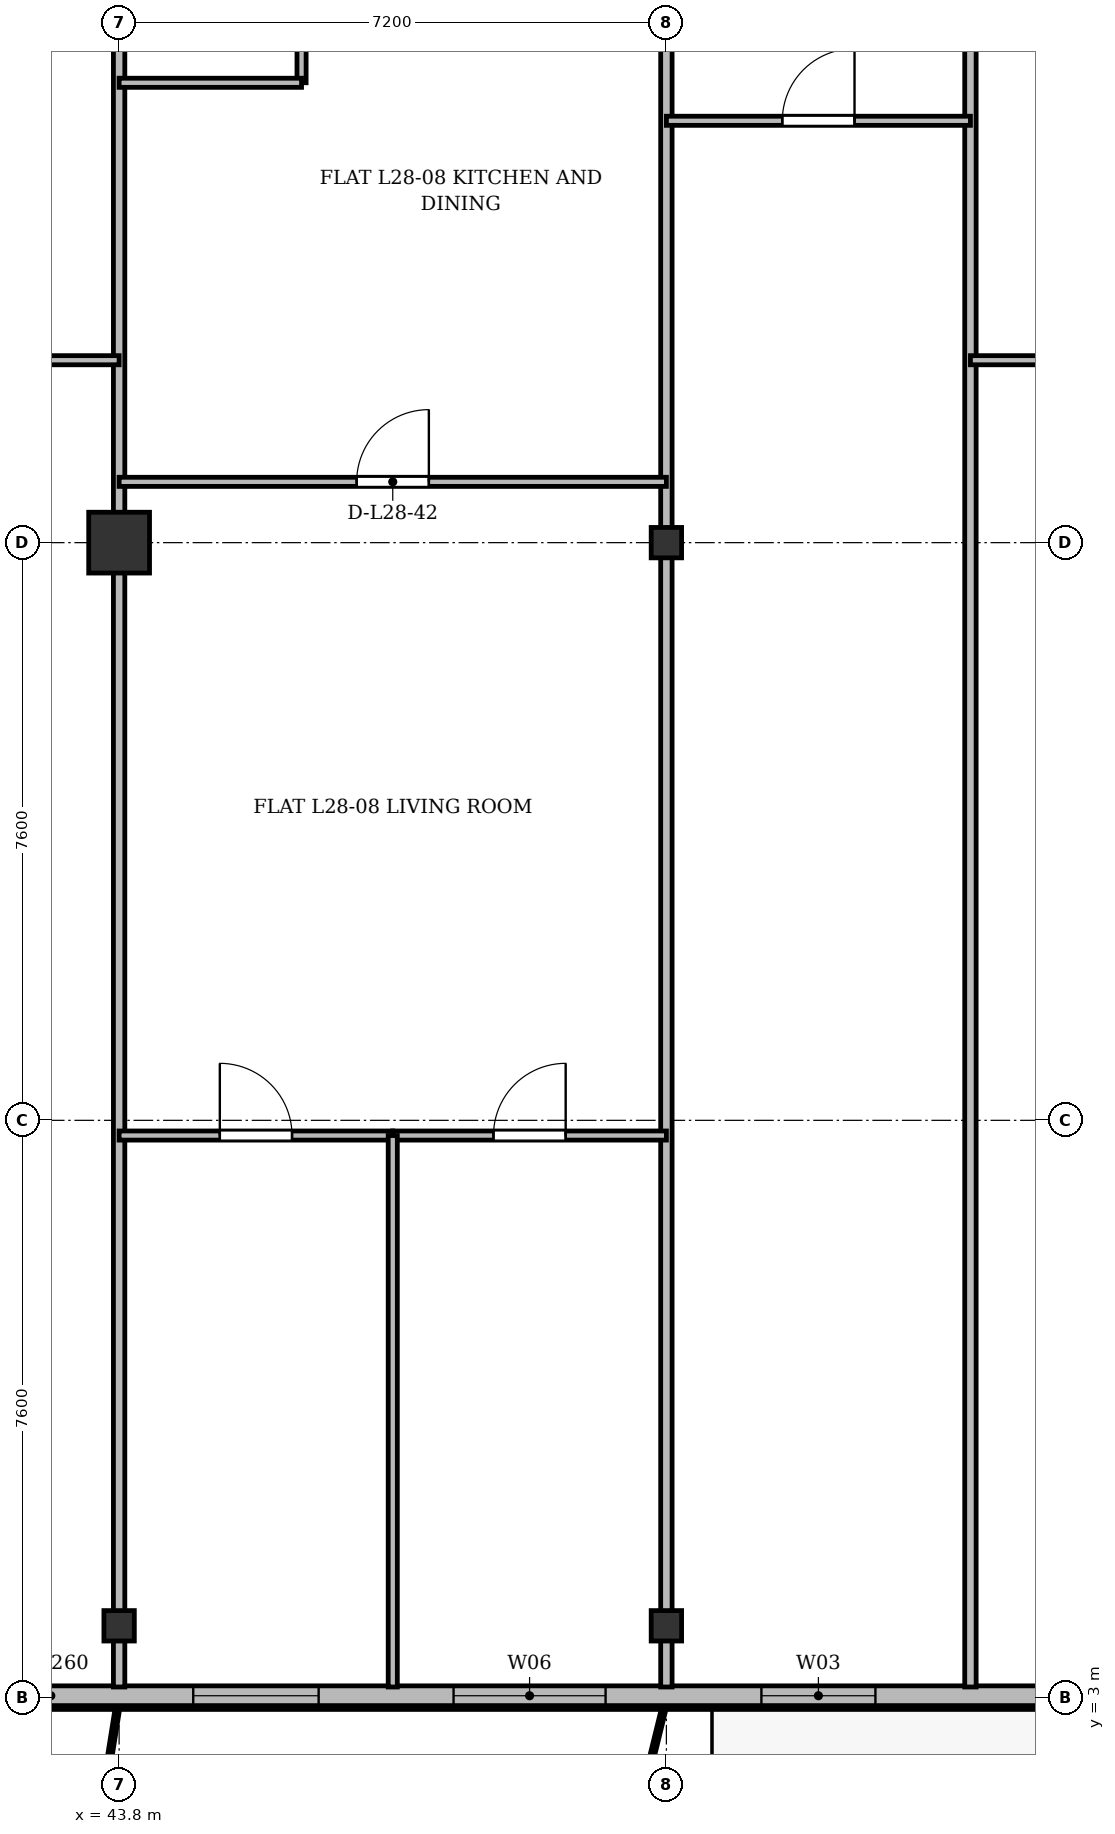
"""IFC4 building model, lengths in metres.
Left out: names, types, materials, properties, quantities, classifications, styles, units other than length and angle.
Written with IfcOpenShell. Run it as: python <this file> out.ifc"""

import sys

from ifc_helpers import new_model, si_unit, direction, frame, frame_2d, origin, origin_2d, place, context, subcontext, project, spatial, rectangle, i_section, extrude, source, transform, mapped, element, fill, save


model = new_model("IFC4")
c1 = context("Model", 3, precision=1e-05, world=origin(), true_north=direction((0.0, 1.0)))
c2 = subcontext(c1, "Body", "Model", "MODEL_VIEW")
j1 = project(units=[si_unit("LENGTHUNIT", "METRE"), si_unit("PLANEANGLEUNIT", "RADIAN")], contexts=[c1])
p1 = place(None, origin())
s1 = spatial("IfcSite", under=j1, at=p1, CompositionType="ELEMENT")
p2 = place(p1, origin())
s2 = spatial("IfcBuilding", under=s1, at=p2, CompositionType="ELEMENT")
p3 = place(p2, frame((0.0, 0.0, 110.5)))
s3 = spatial("IfcBuildingStorey", under=s2, at=p3, CompositionType="ELEMENT", Elevation=110.5)
m1 = source(origin(), c2, "Body", "SweptSolid", [
    extrude(i_section(OverallWidth=0.4, OverallDepth=0.4, WebThickness=0.022, FlangeThickness=0.035, at=origin_2d()), origin(), (0.0, 0.0, 1.0), 3.6),
])
p4 = place(p3, frame((43.8, 3.95, 0.0), z_axis=(0.0, 0.0, 1.0), x_axis=(1.0, 0.0, 0.0)))
e1 = element("IfcColumn", 1, at=p4, inside=s3, PredefinedType="COLUMN", context=c2, shape_type="MappedRepresentation", body=[
    mapped(m1, transform((0.0, 0.0, 0.0), x_axis=(1.0, 0.0, 0.0), y_axis=(0.0, 1.0, 0.0), z_axis=(0.0, 0.0, 1.0), scale=1.0)),
])
m2 = source(origin(), c2, "Body", "SweptSolid", [
    extrude(rectangle(XDim=0.8, YDim=0.8, at=origin_2d()), origin(), (0.0, 0.0, 1.0), 3.6),
])
p5 = place(p3, frame((43.8, 18.2, 0.0), z_axis=(0.0, 0.0, 1.0), x_axis=(1.0, 0.0, 0.0)))
e2 = element("IfcColumn", 2, at=p5, inside=s3, PredefinedType="COLUMN", context=c2, shape_type="MappedRepresentation", body=[
    mapped(m2, transform((0.0, 0.0, 0.0), x_axis=(1.0, 0.0, 0.0), y_axis=(0.0, 1.0, 0.0), z_axis=(0.0, 0.0, 1.0), scale=1.0)),
])
for number, where, z_axis, x_axis in (
    (3, (51.0, 3.95, 0.0), (0.0, 0.0, 1.0), (1.0, 0.0, 0.0)),
    (4, (51.0, 18.2, 0.0), (0.0, 0.0, 1.0), (1.0, 0.0, 0.0)),
):
    element("IfcColumn", number, at=place(p3, frame(where, z_axis=z_axis, x_axis=x_axis)), inside=s3, PredefinedType="COLUMN", context=c2, shape_type="MappedRepresentation", body=[
        mapped(m1, transform((0.0, 0.0, 0.0), x_axis=(1.0, 0.0, 0.0), y_axis=(0.0, 1.0, 0.0), z_axis=(0.0, 0.0, 1.0), scale=1.0)),
    ])
p6 = place(p3, frame((66.9, 3.03, 0.0), z_axis=(0.0, 0.0, 1.0), x_axis=(-1.0, 0.0, 0.0)))
e5 = element("IfcWall", 5, at=p6, inside=s3, PredefinedType="SOLIDWALL", context=c2, shape_type="SweptSolid", body=[
    extrude(rectangle(XDim=59.4, YDim=0.26, at=frame_2d((29.7, 0.0))), origin(), (0.0, 0.0, 1.0), 3.34),
])
p7 = place(p6, frame((2.175, 0.0, 0.9)))
e6 = element("IfcOpeningElement", 6, at=p7, cuts=e5, PredefinedType="OPENING", context=c2, shape_type="SweptSolid", body=[
    extrude(rectangle(XDim=1.65, YDim=1.85, at=frame_2d((0.825, 0.925))), frame((0.0, 0.14, 0.0), z_axis=(0.0, -1.0, 0.0), x_axis=(1.0, 0.0, 0.0)), (0.0, 0.0, 1.0), 0.28),
])
p8 = place(p6, frame((5.5, 0.0, 0.9)))
e7 = element("IfcOpeningElement", 7, at=p8, cuts=e5, PredefinedType="OPENING", context=c2, shape_type="SweptSolid", body=[
    extrude(rectangle(XDim=1.8, YDim=1.8, at=frame_2d((0.9, 0.9))), frame((0.0, 0.14, 0.0), z_axis=(0.0, -1.0, 0.0), x_axis=(1.0, 0.0, 0.0)), (0.0, 0.0, 1.0), 0.28),
])
p9 = place(p6, frame((9.213, 0.0, 0.0)))
e8 = element("IfcOpeningElement", 8, at=p9, cuts=e5, PredefinedType="OPENING", context=c2, shape_type="SweptSolid", body=[
    extrude(rectangle(XDim=1.2, YDim=2.2, at=frame_2d((0.6, 1.1))), frame((0.0, 0.14, 0.0), z_axis=(0.0, -1.0, 0.0), x_axis=(1.0, 0.0, 0.0)), (0.0, 0.0, 1.0), 0.28),
])
p10 = place(p6, frame((13.15, 0.0, 0.9)))
e9 = element("IfcOpeningElement", 9, at=p10, cuts=e5, PredefinedType="OPENING", context=c2, shape_type="SweptSolid", body=[
    extrude(rectangle(XDim=1.5, YDim=1.75, at=frame_2d((0.75, 0.875))), frame((0.0, 0.14, 0.0), z_axis=(0.0, -1.0, 0.0), x_axis=(1.0, 0.0, 0.0)), (0.0, 0.0, 1.0), 0.28),
])
p11 = place(p6, frame((16.7, 0.0, 0.9)))
e10 = element("IfcOpeningElement", 10, at=p11, cuts=e5, PredefinedType="OPENING", context=c2, shape_type="SweptSolid", body=[
    extrude(rectangle(XDim=2.0, YDim=1.95, at=frame_2d((1.0, 0.975))), frame((0.0, 0.14, 0.0), z_axis=(0.0, -1.0, 0.0), x_axis=(1.0, 0.0, 0.0)), (0.0, 0.0, 1.0), 0.28),
])
p12 = place(p6, frame((20.475, 0.0, 0.9)))
e11 = element("IfcOpeningElement", 11, at=p12, cuts=e5, PredefinedType="OPENING", context=c2, shape_type="SweptSolid", body=[
    extrude(rectangle(XDim=1.65, YDim=1.85, at=frame_2d((0.825, 0.925))), frame((0.0, 0.14, 0.0), z_axis=(0.0, -1.0, 0.0), x_axis=(1.0, 0.0, 0.0)), (0.0, 0.0, 1.0), 0.28),
])
p13 = place(p6, frame((25.5, 0.0, 0.9)))
e12 = element("IfcOpeningElement", 12, at=p13, cuts=e5, PredefinedType="OPENING", context=c2, shape_type="SweptSolid", body=[
    extrude(rectangle(XDim=1.8, YDim=1.8, at=frame_2d((0.9, 0.9))), frame((0.0, 0.14, 0.0), z_axis=(0.0, -1.0, 0.0), x_axis=(1.0, 0.0, 0.0)), (0.0, 0.0, 1.0), 0.28),
])
p14 = place(p6, frame((31.9, 0.0, 0.9)))
e13 = element("IfcOpeningElement", 13, at=p14, cuts=e5, PredefinedType="OPENING", context=c2, shape_type="SweptSolid", body=[
    extrude(rectangle(XDim=2.2, YDim=1.8, at=frame_2d((1.1, 0.9))), frame((0.0, 0.14, 0.0), z_axis=(0.0, -1.0, 0.0), x_axis=(1.0, 0.0, 0.0)), (0.0, 0.0, 1.0), 0.28),
])
p15 = place(p6, frame((37.584, 0.0, 0.0)))
e14 = element("IfcOpeningElement", 14, at=p15, cuts=e5, PredefinedType="OPENING", context=c2, shape_type="SweptSolid", body=[
    extrude(rectangle(XDim=1.2, YDim=2.2, at=frame_2d((0.6, 1.1))), frame((0.0, 0.14, 0.0), z_axis=(0.0, -1.0, 0.0), x_axis=(1.0, 0.0, 0.0)), (0.0, 0.0, 1.0), 0.28),
])
p16 = place(p6, frame((40.6, 0.0, 0.9)))
e15 = element("IfcOpeningElement", 15, at=p16, cuts=e5, PredefinedType="OPENING", context=c2, shape_type="SweptSolid", body=[
    extrude(rectangle(XDim=2.0, YDim=1.95, at=frame_2d((1.0, 0.975))), frame((0.0, 0.14, 0.0), z_axis=(0.0, -1.0, 0.0), x_axis=(1.0, 0.0, 0.0)), (0.0, 0.0, 1.0), 0.28),
])
p17 = place(p6, frame((46.575, 0.0, 0.9)))
e16 = element("IfcOpeningElement", 16, at=p17, cuts=e5, PredefinedType="OPENING", context=c2, shape_type="SweptSolid", body=[
    extrude(rectangle(XDim=1.65, YDim=1.85, at=frame_2d((0.825, 0.925))), frame((0.0, 0.14, 0.0), z_axis=(0.0, -1.0, 0.0), x_axis=(1.0, 0.0, 0.0)), (0.0, 0.0, 1.0), 0.28),
])
p18 = place(p6, frame((55.817, 0.0, 0.0)))
e17 = element("IfcOpeningElement", 17, at=p18, cuts=e5, PredefinedType="OPENING", context=c2, shape_type="SweptSolid", body=[
    extrude(rectangle(XDim=1.2, YDim=2.2, at=frame_2d((0.6, 1.1))), frame((0.0, 0.14, 0.0), z_axis=(0.0, -1.0, 0.0), x_axis=(1.0, 0.0, 0.0)), (0.0, 0.0, 1.0), 0.28),
])
for number, where, z_axis, x_axis in (
    (18, (43.8, 3.145, 0.0), (0.0, 0.0, 1.0), (0.0, 1.0, 0.0)),
    (19, (51.0, 3.145, 0.0), (0.0, 0.0, 1.0), (0.0, 1.0, 0.0)),
):
    element("IfcWall", number, at=place(p3, frame(where, z_axis=z_axis, x_axis=x_axis)), inside=s3, PredefinedType="PARTITIONING", context=c2, shape_type="SweptSolid", body=[
        extrude(rectangle(XDim=24.455, YDim=0.15, at=frame_2d((12.228, 0.0))), origin(), (0.0, 0.0, 1.0), 2.84),
    ])
p19 = place(p3, frame((55.0, 3.145, 0.0), z_axis=(0.0, 0.0, 1.0), x_axis=(0.0, 1.0, 0.0)))
e20 = element("IfcWall", 20, at=p19, inside=s3, PredefinedType="PARTITIONING", context=c2, shape_type="SweptSolid", body=[
    extrude(rectangle(XDim=24.455, YDim=0.15, at=frame_2d((12.228, 0.0))), origin(), (0.0, 0.0, 1.0), 2.752),
])
p20 = place(p3, frame((37.2, 20.6, 0.0), z_axis=(0.0, 0.0, 1.0), x_axis=(1.0, 0.0, 0.0)))
e21 = element("IfcWall", 21, at=p20, inside=s3, PredefinedType="PARTITIONING", context=c2, shape_type="SweptSolid", body=[
    extrude(rectangle(XDim=6.6, YDim=0.12, at=frame_2d((3.3, 0.0))), origin(), (0.0, 0.0, 1.0), 2.84),
])
p21 = place(p20, frame((2.734, 0.0, 0.0)))
e22 = element("IfcOpeningElement", 22, at=p21, cuts=e21, PredefinedType="OPENING", context=c2, shape_type="SweptSolid", body=[
    extrude(rectangle(XDim=0.95, YDim=2.15, at=frame_2d((0.475, 1.075))), frame((0.0, 0.07, 0.0), z_axis=(0.0, -1.0, 0.0), x_axis=(1.0, 0.0, 0.0)), (0.0, 0.0, 1.0), 0.14),
])
p22 = place(p3, frame((43.8, 19.0, 0.0), z_axis=(0.0, 0.0, 1.0), x_axis=(1.0, 0.0, 0.0)))
e23 = element("IfcWall", 23, at=p22, inside=s3, PredefinedType="PARTITIONING", context=c2, shape_type="SweptSolid", body=[
    extrude(rectangle(XDim=7.2, YDim=0.12, at=frame_2d((3.6, 0.0))), origin(), (0.0, 0.0, 1.0), 2.84),
])
p23 = place(p22, frame((3.125, 0.0, 0.0)))
e24 = element("IfcOpeningElement", 24, at=p23, cuts=e23, PredefinedType="OPENING", context=c2, shape_type="SweptSolid", body=[
    extrude(rectangle(XDim=0.95, YDim=2.15, at=frame_2d((0.475, 1.075))), frame((0.0, 0.07, 0.0), z_axis=(0.0, -1.0, 0.0), x_axis=(1.0, 0.0, 0.0)), (0.0, 0.0, 1.0), 0.14),
])
p24 = place(p3, frame((46.2, 24.25, 0.0), z_axis=(0.0, 0.0, 1.0), x_axis=(0.0, 1.0, 0.0)))
e25 = element("IfcWall", 25, at=p24, inside=s3, PredefinedType="PARTITIONING", context=c2, shape_type="SweptSolid", body=[
    extrude(rectangle(XDim=3.35, YDim=0.12, at=frame_2d((1.675, 0.0))), origin(), (0.0, 0.0, 1.0), 2.99),
])
p25 = place(p24, frame((0.8, 0.0, 0.0)))
e26 = element("IfcOpeningElement", 26, at=p25, cuts=e25, PredefinedType="OPENING", context=c2, shape_type="SweptSolid", body=[
    extrude(rectangle(XDim=0.85, YDim=2.1, at=frame_2d((0.425, 1.05))), frame((0.0, 0.07, 0.0), z_axis=(0.0, -1.0, 0.0), x_axis=(1.0, 0.0, 0.0)), (0.0, 0.0, 1.0), 0.14),
])
p26 = place(p3, frame((43.8, 24.25, 0.0), z_axis=(0.0, 0.0, 1.0), x_axis=(1.0, 0.0, 0.0)))
e27 = element("IfcWall", 27, at=p26, inside=s3, PredefinedType="PARTITIONING", context=c2, shape_type="SweptSolid", body=[
    extrude(rectangle(XDim=2.4, YDim=0.12, at=frame_2d((1.2, 0.0))), origin(), (0.0, 0.0, 1.0), 2.84),
])
p27 = place(p3, frame((43.8, 10.4, 0.0), z_axis=(0.0, 0.0, 1.0), x_axis=(1.0, 0.0, 0.0)))
e28 = element("IfcWall", 28, at=p27, inside=s3, PredefinedType="PARTITIONING", context=c2, shape_type="SweptSolid", body=[
    extrude(rectangle(XDim=3.6, YDim=0.12, at=frame_2d((1.8, 0.0))), origin(), (0.0, 0.0, 1.0), 2.84),
])
p28 = place(p27, frame((1.325, 0.0, 0.0)))
e29 = element("IfcOpeningElement", 29, at=p28, cuts=e28, PredefinedType="OPENING", context=c2, shape_type="SweptSolid", body=[
    extrude(rectangle(XDim=0.95, YDim=2.15, at=frame_2d((0.475, 1.075))), frame((0.0, 0.07, 0.0), z_axis=(0.0, -1.0, 0.0), x_axis=(1.0, 0.0, 0.0)), (0.0, 0.0, 1.0), 0.14),
])
p29 = place(p3, frame((47.4, 10.4, 0.0), z_axis=(0.0, 0.0, 1.0), x_axis=(1.0, 0.0, 0.0)))
e30 = element("IfcWall", 30, at=p29, inside=s3, PredefinedType="PARTITIONING", context=c2, shape_type="SweptSolid", body=[
    extrude(rectangle(XDim=3.6, YDim=0.12, at=frame_2d((1.8, 0.0))), origin(), (0.0, 0.0, 1.0), 2.84),
])
p30 = place(p29, frame((1.325, 0.0, 0.0)))
e31 = element("IfcOpeningElement", 31, at=p30, cuts=e30, PredefinedType="OPENING", context=c2, shape_type="SweptSolid", body=[
    extrude(rectangle(XDim=0.95, YDim=2.15, at=frame_2d((0.475, 1.075))), frame((0.0, 0.07, 0.0), z_axis=(0.0, -1.0, 0.0), x_axis=(1.0, 0.0, 0.0)), (0.0, 0.0, 1.0), 0.14),
])
p31 = place(p3, frame((47.4, 3.145, 0.0), z_axis=(0.0, 0.0, 1.0), x_axis=(0.0, 1.0, 0.0)))
e32 = element("IfcWall", 32, at=p31, inside=s3, PredefinedType="PARTITIONING", context=c2, shape_type="SweptSolid", body=[
    extrude(rectangle(XDim=7.255, YDim=0.12, at=frame_2d((3.627, 0.0))), origin(), (0.0, 0.0, 1.0), 2.752),
])
p32 = place(p3, frame((51.0, 23.75, 0.0), z_axis=(0.0, 0.0, 1.0), x_axis=(1.0, 0.0, 0.0)))
e33 = element("IfcWall", 33, at=p32, inside=s3, PredefinedType="PARTITIONING", context=c2, shape_type="SweptSolid", body=[
    extrude(rectangle(XDim=4.0, YDim=0.12, at=frame_2d((2.0, 0.0))), origin(), (0.0, 0.0, 1.0), 2.84),
])
p33 = place(p32, frame((1.525, 0.0, 0.0)))
e34 = element("IfcOpeningElement", 34, at=p33, cuts=e33, PredefinedType="OPENING", context=c2, shape_type="SweptSolid", body=[
    extrude(rectangle(XDim=0.95, YDim=2.15, at=frame_2d((0.475, 1.075))), frame((0.0, 0.07, 0.0), z_axis=(0.0, -1.0, 0.0), x_axis=(1.0, 0.0, 0.0)), (0.0, 0.0, 1.0), 0.14),
])
p34 = place(p3, frame((55.0, 20.6, 0.0), z_axis=(0.0, 0.0, 1.0), x_axis=(1.0, 0.0, 0.0)))
e35 = element("IfcWall", 35, at=p34, inside=s3, PredefinedType="PARTITIONING", context=c2, shape_type="SweptSolid", body=[
    extrude(rectangle(XDim=3.8, YDim=0.12, at=frame_2d((1.9, 0.0))), origin(), (0.0, 0.0, 1.0), 2.84),
])
p35 = place(p34, frame((1.33, 0.0, 0.0)))
e36 = element("IfcOpeningElement", 36, at=p35, cuts=e35, PredefinedType="OPENING", context=c2, shape_type="SweptSolid", body=[
    extrude(rectangle(XDim=0.95, YDim=2.15, at=frame_2d((0.475, 1.075))), frame((0.0, 0.07, 0.0), z_axis=(0.0, -1.0, 0.0), x_axis=(1.0, 0.0, 0.0)), (0.0, 0.0, 1.0), 0.14),
])
m3 = source(origin(), c2, "Body", "SweptSolid", [
    extrude(rectangle(XDim=1.5, YDim=1.75, at=frame_2d((0.75, 0.875))), frame((0.0, 0.03, 0.0), z_axis=(0.0, -1.0, 0.0), x_axis=(1.0, 0.0, 0.0)), (0.0, 0.0, 1.0), 0.06),
])
p36 = place(p10, origin())
e37 = element("IfcWindow", 37, at=p36, inside=s3, PartitioningType="SINGLE_PANEL", PredefinedType="WINDOW", context=c2, shape_type="MappedRepresentation", body=[
    mapped(m3, transform((0.0, 0.0, 0.0), x_axis=(1.0, 0.0, 0.0), y_axis=(0.0, 1.0, 0.0), z_axis=(0.0, 0.0, 1.0), scale=1.0)),
])
fill(e9, e37)
m4 = source(origin(), c2, "Body", "SweptSolid", [
    extrude(rectangle(XDim=2.0, YDim=1.95, at=frame_2d((1.0, 0.975))), frame((0.0, 0.03, 0.0), z_axis=(0.0, -1.0, 0.0), x_axis=(1.0, 0.0, 0.0)), (0.0, 0.0, 1.0), 0.06),
])
p37 = place(p11, origin())
e38 = element("IfcWindow", 38, at=p37, inside=s3, PartitioningType="SINGLE_PANEL", PredefinedType="WINDOW", context=c2, shape_type="MappedRepresentation", body=[
    mapped(m4, transform((0.0, 0.0, 0.0), x_axis=(1.0, 0.0, 0.0), y_axis=(0.0, 1.0, 0.0), z_axis=(0.0, 0.0, 1.0), scale=1.0)),
])
fill(e10, e38)
m5 = source(origin(), c2, "Body", "SweptSolid", [
    extrude(rectangle(XDim=1.65, YDim=1.85, at=frame_2d((0.825, 0.925))), frame((0.0, 0.03, 0.0), z_axis=(0.0, -1.0, 0.0), x_axis=(1.0, 0.0, 0.0)), (0.0, 0.0, 1.0), 0.06),
])
p38 = place(p12, origin())
e39 = element("IfcWindow", 39, at=p38, inside=s3, PartitioningType="SINGLE_PANEL", PredefinedType="WINDOW", context=c2, shape_type="MappedRepresentation", body=[
    mapped(m5, transform((0.0, 0.0, 0.0), x_axis=(1.0, 0.0, 0.0), y_axis=(0.0, 1.0, 0.0), z_axis=(0.0, 0.0, 1.0), scale=1.0)),
])
fill(e11, e39)
m6 = source(origin(), c2, "Body", "SweptSolid", [
    extrude(rectangle(XDim=0.95, YDim=2.15, at=frame_2d((0.475, 1.075))), frame((0.0, 0.025, 0.0), z_axis=(0.0, -1.0, 0.0), x_axis=(1.0, 0.0, 0.0)), (0.0, 0.0, 1.0), 0.05),
])
p39 = place(p23, origin())
e40 = element("IfcDoor", 40, at=p39, inside=s3, OperationType="SINGLE_SWING_RIGHT", PredefinedType="DOOR", context=c2, shape_type="MappedRepresentation", body=[
    mapped(m6, transform((0.0, 0.0, 0.0), x_axis=(1.0, 0.0, 0.0), y_axis=(0.0, 1.0, 0.0), z_axis=(0.0, 0.0, 1.0), scale=1.0)),
])
fill(e24, e40)
p40 = place(p28, origin())
e41 = element("IfcDoor", 41, at=p40, inside=s3, OperationType="SINGLE_SWING_LEFT", PredefinedType="DOOR", context=c2, shape_type="MappedRepresentation", body=[
    mapped(m6, transform((0.0, 0.0, 0.0), x_axis=(1.0, 0.0, 0.0), y_axis=(0.0, 1.0, 0.0), z_axis=(0.0, 0.0, 1.0), scale=1.0)),
])
fill(e29, e41)
p41 = place(p30, origin())
e42 = element("IfcDoor", 42, at=p41, inside=s3, OperationType="SINGLE_SWING_RIGHT", PredefinedType="DOOR", context=c2, shape_type="MappedRepresentation", body=[
    mapped(m6, transform((0.0, 0.0, 0.0), x_axis=(1.0, 0.0, 0.0), y_axis=(0.0, 1.0, 0.0), z_axis=(0.0, 0.0, 1.0), scale=1.0)),
])
fill(e31, e42)
p42 = place(p33, origin())
e43 = element("IfcDoor", 43, at=p42, inside=s3, OperationType="SINGLE_SWING_RIGHT", PredefinedType="DOOR", context=c2, shape_type="MappedRepresentation", body=[
    mapped(m6, transform((0.0, 0.0, 0.0), x_axis=(1.0, 0.0, 0.0), y_axis=(0.0, 1.0, 0.0), z_axis=(0.0, 0.0, 1.0), scale=1.0)),
])
fill(e34, e43)
save(model, sys.argv[1])
